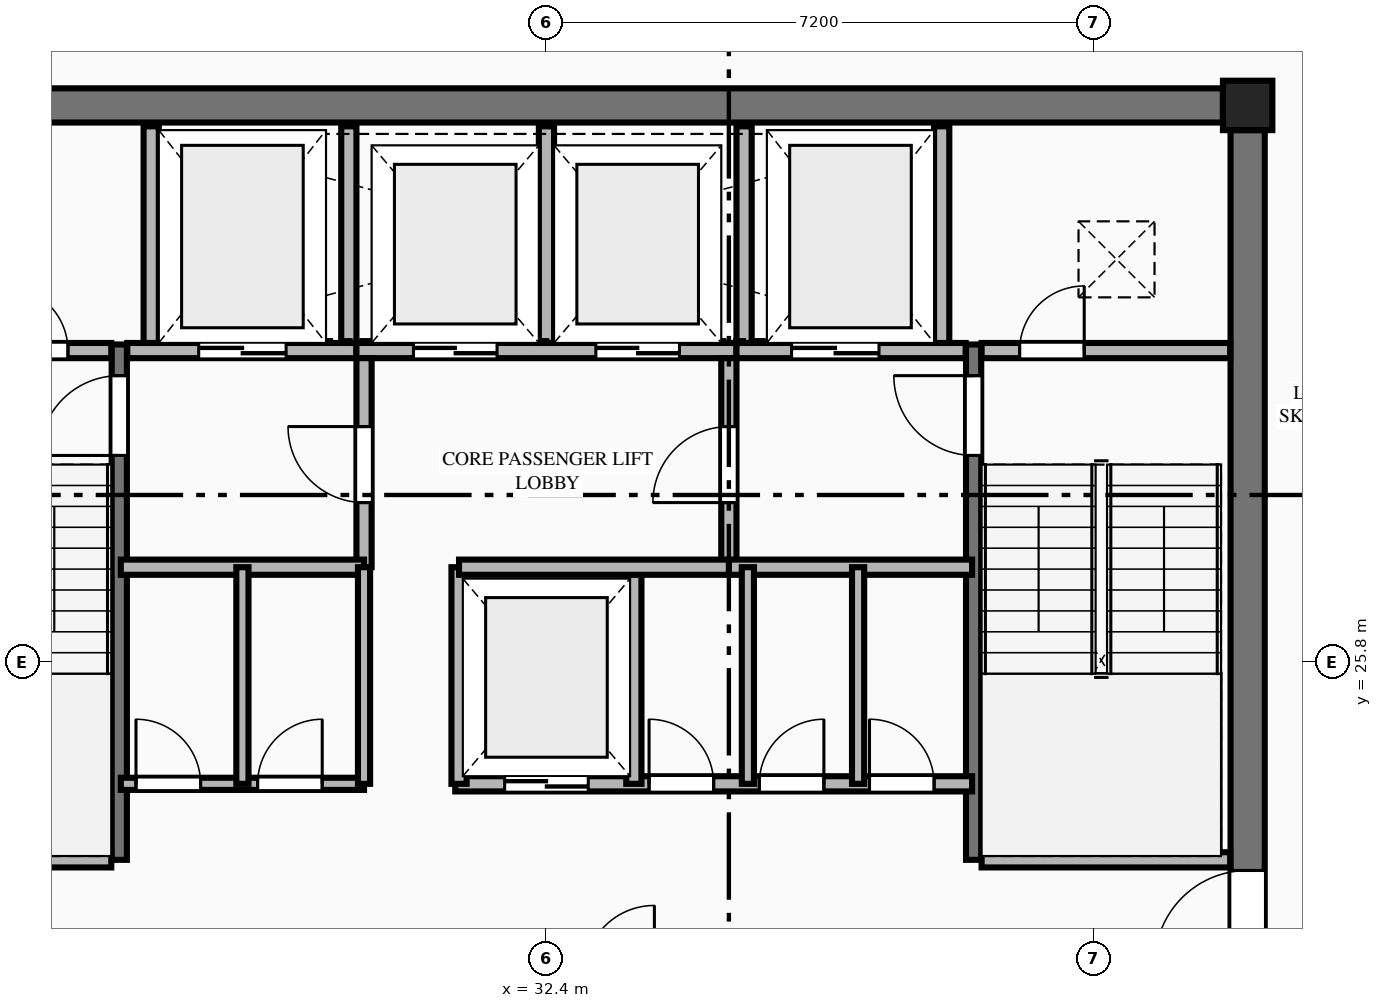
"""IFC4 building model, lengths in metres.
Left out: names, types, materials, properties, quantities, classifications, styles, units other than length and angle.
Written with IfcOpenShell. Run it as: python <this file> out.ifc"""

import sys

from ifc_helpers import new_model, si_unit, direction, frame, frame_2d, origin, origin_2d, place, context, subcontext, project, spatial, rectangle, extrude, element, fill, save


model = new_model("IFC4")
c1 = context("Model", 3, precision=1e-05, world=origin(), true_north=direction((0.0, 1.0)))
c2 = subcontext(c1, "Body", "Model", "MODEL_VIEW")
j1 = project(units=[si_unit("LENGTHUNIT", "METRE"), si_unit("PLANEANGLEUNIT", "RADIAN")], contexts=[c1])
p1 = place(None, origin())
s1 = spatial("IfcSite", under=j1, at=p1, CompositionType="ELEMENT")
p2 = place(p1, origin())
s2 = spatial("IfcBuilding", under=s1, at=p2, CompositionType="ELEMENT")
p3 = place(p2, frame((0.0, 0.0, 234.3)))
s3 = spatial("IfcBuildingStorey", under=s2, at=p3, CompositionType="ELEMENT", Elevation=234.3)
p4 = place(p3, frame((41.625, 33.125, 0.0), z_axis=(0.0, 0.0, 1.0), x_axis=(1.0, 0.0, 0.0)))
e1 = element("IfcColumn", 1, at=p4, inside=s3, PredefinedType="COLUMN", context=c2, shape_type="SweptSolid", body=[
    extrude(rectangle(XDim=0.65, YDim=0.65, at=origin_2d()), origin(), (0.0, 0.0, 1.0), 3.65),
])
p5 = place(p3, frame((23.5, 33.125, 0.0), z_axis=(0.0, 0.0, 1.0), x_axis=(1.0, 0.0, 0.0)))
e2 = element("IfcWall", 2, at=p5, inside=s3, PredefinedType="SHEAR", context=c2, shape_type="SweptSolid", body=[
    extrude(rectangle(XDim=17.8, YDim=0.45, at=frame_2d((8.9, 0.0))), origin(), (0.0, 0.0, 1.0), 3.45),
])
p6 = place(p3, frame((41.625, 19.0, 0.0), z_axis=(0.0, 0.0, 1.0), x_axis=(0.0, 1.0, 0.0)))
e3 = element("IfcWall", 3, at=p6, inside=s3, PredefinedType="SHEAR", context=c2, shape_type="SweptSolid", body=[
    extrude(rectangle(XDim=13.8, YDim=0.45, at=frame_2d((6.9, 0.0))), origin(), (0.0, 0.0, 1.0), 3.45),
])
p7 = place(p6, frame((2.84, 0.0, 0.0)))
e4 = element("IfcOpeningElement", 4, at=p7, cuts=e3, PredefinedType="OPENING", context=c2, shape_type="SweptSolid", body=[
    extrude(rectangle(XDim=1.22, YDim=2.25, at=frame_2d((0.61, 1.125))), frame((0.0, 0.235, 0.0), z_axis=(0.0, -1.0, 0.0), x_axis=(1.0, 0.0, 0.0)), (0.0, 0.0, 1.0), 0.47),
])
p8 = place(p3, frame((26.78, 23.2, 0.0), z_axis=(0.0, 0.0, 1.0), x_axis=(0.0, 1.0, 0.0)))
e5 = element("IfcWall", 5, at=p8, inside=s3, PredefinedType="SHEAR", context=c2, shape_type="SweptSolid", body=[
    extrude(rectangle(XDim=6.78, YDim=0.2, at=frame_2d((3.39, 0.0))), origin(), (0.0, 0.0, 1.0), 3.65),
])
p9 = place(p8, frame((5.32, 0.0, 0.0)))
e6 = element("IfcOpeningElement", 6, at=p9, cuts=e5, PredefinedType="OPENING", context=c2, shape_type="SweptSolid", body=[
    extrude(rectangle(XDim=1.05, YDim=2.15, at=frame_2d((0.525, 1.075))), frame((0.0, 0.11, 0.0), z_axis=(0.0, -1.0, 0.0), x_axis=(1.0, 0.0, 0.0)), (0.0, 0.0, 1.0), 0.22),
])
p10 = place(p3, frame((23.405, 23.2, 0.0), z_axis=(0.0, 0.0, 1.0), x_axis=(1.0, 0.0, 0.0)))
e7 = element("IfcWall", 7, at=p10, inside=s3, PredefinedType="PLUMBINGWALL", context=c2, shape_type="SweptSolid", body=[
    extrude(rectangle(XDim=3.27, YDim=0.2, at=frame_2d((1.635, 0.0))), origin(), (0.0, 0.0, 1.0), 3.45),
])
p11 = place(p3, frame((38.02, 23.2, 0.0), z_axis=(0.0, 0.0, 1.0), x_axis=(0.0, 1.0, 0.0)))
e8 = element("IfcWall", 8, at=p11, inside=s3, PredefinedType="SHEAR", context=c2, shape_type="SweptSolid", body=[
    extrude(rectangle(XDim=6.78, YDim=0.2, at=frame_2d((3.39, 0.0))), origin(), (0.0, 0.0, 1.0), 3.65),
])
p12 = place(p11, frame((5.32, 0.0, 0.0)))
e9 = element("IfcOpeningElement", 9, at=p12, cuts=e8, PredefinedType="OPENING", context=c2, shape_type="SweptSolid", body=[
    extrude(rectangle(XDim=1.05, YDim=2.15, at=frame_2d((0.525, 1.075))), frame((0.0, 0.11, 0.0), z_axis=(0.0, -1.0, 0.0), x_axis=(1.0, 0.0, 0.0)), (0.0, 0.0, 1.0), 0.22),
])
p13 = place(p3, frame((38.125, 23.2, 0.0), z_axis=(0.0, 0.0, 1.0), x_axis=(1.0, 0.0, 0.0)))
e10 = element("IfcWall", 10, at=p13, inside=s3, PredefinedType="PLUMBINGWALL", context=c2, shape_type="SweptSolid", body=[
    extrude(rectangle(XDim=3.27, YDim=0.2, at=frame_2d((1.635, 0.0))), origin(), (0.0, 0.0, 1.0), 3.45),
])
p14 = place(p3, frame((23.405, 29.9, 0.0), z_axis=(0.0, 0.0, 1.0), x_axis=(1.0, 0.0, 0.0)))
e11 = element("IfcWall", 11, at=p14, inside=s3, PredefinedType="PLUMBINGWALL", context=c2, shape_type="SweptSolid", body=[
    extrude(rectangle(XDim=3.27, YDim=0.2, at=frame_2d((1.635, 0.0))), origin(), (0.0, 0.0, 1.0), 3.45),
])
p15 = place(p14, frame((1.85, 0.0, 0.0)))
e12 = element("IfcOpeningElement", 12, at=p15, cuts=e11, PredefinedType="OPENING", context=c2, shape_type="SweptSolid", body=[
    extrude(rectangle(XDim=0.85, YDim=2.05, at=frame_2d((0.425, 1.025))), frame((0.0, 0.11, 0.0), z_axis=(0.0, -1.0, 0.0), x_axis=(1.0, 0.0, 0.0)), (0.0, 0.0, 1.0), 0.22),
])
p16 = place(p3, frame((26.885, 29.9, 0.0), z_axis=(0.0, 0.0, 1.0), x_axis=(1.0, 0.0, 0.0)))
e13 = element("IfcWall", 13, at=p16, inside=s3, PredefinedType="PLUMBINGWALL", context=c2, shape_type="SweptSolid", body=[
    extrude(rectangle(XDim=3.015, YDim=0.2, at=frame_2d((1.507, 0.0))), origin(), (0.0, 0.0, 1.0), 3.45),
])
p17 = place(p16, frame((0.94, 0.0, 0.0)))
e14 = element("IfcOpeningElement", 14, at=p17, cuts=e13, PredefinedType="OPENING", context=c2, shape_type="SweptSolid", body=[
    extrude(rectangle(XDim=1.15, YDim=2.2, at=frame_2d((0.575, 1.1))), frame((0.0, 0.11, 0.0), z_axis=(0.0, -1.0, 0.0), x_axis=(1.0, 0.0, 0.0)), (0.0, 0.0, 1.0), 0.22),
])
p18 = place(p3, frame((29.9, 29.9, 0.0), z_axis=(0.0, 0.0, 1.0), x_axis=(1.0, 0.0, 0.0)))
e15 = element("IfcWall", 15, at=p18, inside=s3, PredefinedType="PLUMBINGWALL", context=c2, shape_type="SweptSolid", body=[
    extrude(rectangle(XDim=5.0, YDim=0.2, at=frame_2d((2.5, 0.0))), origin(), (0.0, 0.0, 1.0), 3.45),
])
p19 = place(p18, frame((0.75, 0.0, 0.0)))
e16 = element("IfcOpeningElement", 16, at=p19, cuts=e15, PredefinedType="OPENING", context=c2, shape_type="SweptSolid", body=[
    extrude(rectangle(XDim=1.1, YDim=2.2, at=frame_2d((0.55, 1.1))), frame((0.0, 0.11, 0.0), z_axis=(0.0, -1.0, 0.0), x_axis=(1.0, 0.0, 0.0)), (0.0, 0.0, 1.0), 0.22),
])
p20 = place(p18, frame((3.15, 0.0, 0.0)))
e17 = element("IfcOpeningElement", 17, at=p20, cuts=e15, PredefinedType="OPENING", context=c2, shape_type="SweptSolid", body=[
    extrude(rectangle(XDim=1.1, YDim=2.2, at=frame_2d((0.55, 1.1))), frame((0.0, 0.11, 0.0), z_axis=(0.0, -1.0, 0.0), x_axis=(1.0, 0.0, 0.0)), (0.0, 0.0, 1.0), 0.22),
])
p21 = place(p3, frame((34.9, 29.9, 0.0), z_axis=(0.0, 0.0, 1.0), x_axis=(1.0, 0.0, 0.0)))
e18 = element("IfcWall", 18, at=p21, inside=s3, PredefinedType="PLUMBINGWALL", context=c2, shape_type="SweptSolid", body=[
    extrude(rectangle(XDim=3.015, YDim=0.2, at=frame_2d((1.508, 0.0))), origin(), (0.0, 0.0, 1.0), 3.45),
])
p22 = place(p21, frame((0.725, 0.0, 0.0)))
e19 = element("IfcOpeningElement", 19, at=p22, cuts=e18, PredefinedType="OPENING", context=c2, shape_type="SweptSolid", body=[
    extrude(rectangle(XDim=1.15, YDim=2.2, at=frame_2d((0.575, 1.1))), frame((0.0, 0.11, 0.0), z_axis=(0.0, -1.0, 0.0), x_axis=(1.0, 0.0, 0.0)), (0.0, 0.0, 1.0), 0.22),
])
p23 = place(p3, frame((38.125, 29.9, 0.0), z_axis=(0.0, 0.0, 1.0), x_axis=(1.0, 0.0, 0.0)))
e20 = element("IfcWall", 20, at=p23, inside=s3, PredefinedType="PLUMBINGWALL", context=c2, shape_type="SweptSolid", body=[
    extrude(rectangle(XDim=3.27, YDim=0.2, at=frame_2d((1.635, 0.0))), origin(), (0.0, 0.0, 1.0), 3.45),
])
p24 = place(p23, frame((0.5, 0.0, 0.0)))
e21 = element("IfcOpeningElement", 21, at=p24, cuts=e20, PredefinedType="OPENING", context=c2, shape_type="SweptSolid", body=[
    extrude(rectangle(XDim=0.85, YDim=2.05, at=frame_2d((0.425, 1.025))), frame((0.0, 0.11, 0.0), z_axis=(0.0, -1.0, 0.0), x_axis=(1.0, 0.0, 0.0)), (0.0, 0.0, 1.0), 0.22),
])
for number, where, z_axis, x_axis in (
    (22, (27.2, 30.0, 0.0), (0.0, 0.0, 1.0), (0.0, 1.0, 0.0)),
    (23, (29.8, 30.0, 0.0), (0.0, 0.0, 1.0), (0.0, 1.0, 0.0)),
    (24, (32.4, 30.0, 0.0), (0.0, 0.0, 1.0), (0.0, 1.0, 0.0)),
    (25, (35.0, 30.0, 0.0), (0.0, 0.0, 1.0), (0.0, 1.0, 0.0)),
    (26, (37.6, 30.0, 0.0), (0.0, 0.0, 1.0), (0.0, 1.0, 0.0)),
):
    element("IfcWall", number, at=place(p3, frame(where, z_axis=z_axis, x_axis=x_axis)), inside=s3, PredefinedType="PLUMBINGWALL", context=c2, shape_type="SweptSolid", body=[
        extrude(rectangle(XDim=2.85, YDim=0.2, at=frame_2d((1.425, 0.0))), origin(), (0.0, 0.0, 1.0), 3.45),
    ])
p25 = place(p3, frame((30.0, 27.05, 0.0), z_axis=(0.0, 0.0, 1.0), x_axis=(0.0, 1.0, 0.0)))
e27 = element("IfcWall", 27, at=p25, inside=s3, PredefinedType="PLUMBINGWALL", context=c2, shape_type="SweptSolid", body=[
    extrude(rectangle(XDim=2.75, YDim=0.2, at=frame_2d((1.375, 0.0))), origin(), (0.0, 0.0, 1.0), 3.45),
])
p26 = place(p25, frame((0.85, 0.0, 0.0)))
e28 = element("IfcOpeningElement", 28, at=p26, cuts=e27, PredefinedType="OPENING", context=c2, shape_type="SweptSolid", body=[
    extrude(rectangle(XDim=1.0, YDim=2.15, at=frame_2d((0.5, 1.075))), frame((0.0, 0.11, 0.0), z_axis=(0.0, -1.0, 0.0), x_axis=(1.0, 0.0, 0.0)), (0.0, 0.0, 1.0), 0.22),
])
p27 = place(p3, frame((26.8, 27.05, 0.0), z_axis=(0.0, 0.0, 1.0), x_axis=(1.0, 0.0, 0.0)))
e29 = element("IfcWall", 29, at=p27, inside=s3, PredefinedType="PLUMBINGWALL", context=c2, shape_type="SweptSolid", body=[
    extrude(rectangle(XDim=3.2, YDim=0.2, at=frame_2d((1.6, 0.0))), origin(), (0.0, 0.0, 1.0), 3.45),
])
p28 = place(p3, frame((34.8, 27.05, 0.0), z_axis=(0.0, 0.0, 1.0), x_axis=(0.0, 1.0, 0.0)))
e30 = element("IfcWall", 30, at=p28, inside=s3, PredefinedType="PLUMBINGWALL", context=c2, shape_type="SweptSolid", body=[
    extrude(rectangle(XDim=2.75, YDim=0.2, at=frame_2d((1.375, 0.0))), origin(), (0.0, 0.0, 1.0), 3.45),
])
p29 = place(p28, frame((0.85, 0.0, 0.0)))
e31 = element("IfcOpeningElement", 31, at=p29, cuts=e30, PredefinedType="OPENING", context=c2, shape_type="SweptSolid", body=[
    extrude(rectangle(XDim=1.0, YDim=2.15, at=frame_2d((0.5, 1.075))), frame((0.0, 0.11, 0.0), z_axis=(0.0, -1.0, 0.0), x_axis=(1.0, 0.0, 0.0)), (0.0, 0.0, 1.0), 0.22),
])
p30 = place(p3, frame((34.8, 27.05, 0.0), z_axis=(0.0, 0.0, 1.0), x_axis=(1.0, 0.0, 0.0)))
e32 = element("IfcWall", 32, at=p30, inside=s3, PredefinedType="PLUMBINGWALL", context=c2, shape_type="SweptSolid", body=[
    extrude(rectangle(XDim=3.2, YDim=0.2, at=frame_2d((1.6, 0.0))), origin(), (0.0, 0.0, 1.0), 3.45),
])
p31 = place(p3, frame((26.8, 24.2, 0.0), z_axis=(0.0, 0.0, 1.0), x_axis=(1.0, 0.0, 0.0)))
e33 = element("IfcWall", 33, at=p31, inside=s3, PredefinedType="PARTITIONING", context=c2, shape_type="SweptSolid", body=[
    extrude(rectangle(XDim=3.2, YDim=0.16, at=frame_2d((1.6, 0.0))), origin(), (0.0, 0.0, 1.0), 3.45),
])
p32 = place(p31, frame((0.2, 0.0, 0.0)))
e34 = element("IfcOpeningElement", 34, at=p32, cuts=e33, PredefinedType="OPENING", context=c2, shape_type="SweptSolid", body=[
    extrude(rectangle(XDim=0.85, YDim=2.05, at=frame_2d((0.425, 1.025))), frame((0.0, 0.09, 0.0), z_axis=(0.0, -1.0, 0.0), x_axis=(1.0, 0.0, 0.0)), (0.0, 0.0, 1.0), 0.18),
])
p33 = place(p31, frame((1.8, 0.0, 0.0)))
e35 = element("IfcOpeningElement", 35, at=p33, cuts=e33, PredefinedType="OPENING", context=c2, shape_type="SweptSolid", body=[
    extrude(rectangle(XDim=0.85, YDim=2.05, at=frame_2d((0.425, 1.025))), frame((0.0, 0.09, 0.0), z_axis=(0.0, -1.0, 0.0), x_axis=(1.0, 0.0, 0.0)), (0.0, 0.0, 1.0), 0.18),
])
p34 = place(p3, frame((30.0, 24.2, 0.0), z_axis=(0.0, 0.0, 1.0), x_axis=(0.0, 1.0, 0.0)))
e36 = element("IfcWall", 36, at=p34, inside=s3, PredefinedType="PARTITIONING", context=c2, shape_type="SweptSolid", body=[
    extrude(rectangle(XDim=2.85, YDim=0.16, at=frame_2d((1.425, 0.0))), origin(), (0.0, 0.0, 1.0), 3.45),
])
p35 = place(p3, frame((31.2, 24.2, 0.0), z_axis=(0.0, 0.0, 1.0), x_axis=(1.0, 0.0, 0.0)))
e37 = element("IfcWall", 37, at=p35, inside=s3, PredefinedType="PLUMBINGWALL", context=c2, shape_type="SweptSolid", body=[
    extrude(rectangle(XDim=6.8, YDim=0.2, at=frame_2d((3.4, 0.0))), origin(), (0.0, 0.0, 1.0), 3.45),
])
p36 = place(p35, frame((0.65, 0.0, 0.0)))
e38 = element("IfcOpeningElement", 38, at=p36, cuts=e37, PredefinedType="OPENING", context=c2, shape_type="SweptSolid", body=[
    extrude(rectangle(XDim=1.1, YDim=2.2, at=frame_2d((0.55, 1.1))), frame((0.0, 0.11, 0.0), z_axis=(0.0, -1.0, 0.0), x_axis=(1.0, 0.0, 0.0)), (0.0, 0.0, 1.0), 0.22),
])
p37 = place(p35, frame((2.55, 0.0, 0.0)))
e39 = element("IfcOpeningElement", 39, at=p37, cuts=e37, PredefinedType="OPENING", context=c2, shape_type="SweptSolid", body=[
    extrude(rectangle(XDim=0.85, YDim=2.05, at=frame_2d((0.425, 1.025))), frame((0.0, 0.11, 0.0), z_axis=(0.0, -1.0, 0.0), x_axis=(1.0, 0.0, 0.0)), (0.0, 0.0, 1.0), 0.22),
])
p38 = place(p35, frame((4.0, 0.0, 0.0)))
e40 = element("IfcOpeningElement", 40, at=p38, cuts=e37, PredefinedType="OPENING", context=c2, shape_type="SweptSolid", body=[
    extrude(rectangle(XDim=0.85, YDim=2.05, at=frame_2d((0.425, 1.025))), frame((0.0, 0.11, 0.0), z_axis=(0.0, -1.0, 0.0), x_axis=(1.0, 0.0, 0.0)), (0.0, 0.0, 1.0), 0.22),
])
p39 = place(p35, frame((5.45, 0.0, 0.0)))
e41 = element("IfcOpeningElement", 41, at=p39, cuts=e37, PredefinedType="OPENING", context=c2, shape_type="SweptSolid", body=[
    extrude(rectangle(XDim=0.85, YDim=2.05, at=frame_2d((0.425, 1.025))), frame((0.0, 0.11, 0.0), z_axis=(0.0, -1.0, 0.0), x_axis=(1.0, 0.0, 0.0)), (0.0, 0.0, 1.0), 0.22),
])
for number, where, z_axis, x_axis in (
    (42, (31.25, 24.2, 0.0), (0.0, 0.0, 1.0), (0.0, 1.0, 0.0)),
    (43, (33.55, 24.2, 0.0), (0.0, 0.0, 1.0), (0.0, 1.0, 0.0)),
):
    element("IfcWall", number, at=place(p3, frame(where, z_axis=z_axis, x_axis=x_axis)), inside=s3, PredefinedType="PLUMBINGWALL", context=c2, shape_type="SweptSolid", body=[
        extrude(rectangle(XDim=2.85, YDim=0.2, at=frame_2d((1.425, 0.0))), origin(), (0.0, 0.0, 1.0), 3.45),
    ])
p40 = place(p3, frame((31.25, 27.05, 0.0), z_axis=(0.0, 0.0, 1.0), x_axis=(1.0, 0.0, 0.0)))
e44 = element("IfcWall", 44, at=p40, inside=s3, PredefinedType="PLUMBINGWALL", context=c2, shape_type="SweptSolid", body=[
    extrude(rectangle(XDim=3.55, YDim=0.2, at=frame_2d((1.775, 0.0))), origin(), (0.0, 0.0, 1.0), 3.45),
])
for number, where, z_axis, x_axis in (
    (45, (28.4, 24.2, 0.0), (0.0, 0.0, 1.0), (0.0, 1.0, 0.0)),
    (46, (35.05, 24.2, 0.0), (0.0, 0.0, 1.0), (0.0, 1.0, 0.0)),
    (47, (36.5, 24.2, 0.0), (0.0, 0.0, 1.0), (0.0, 1.0, 0.0)),
):
    element("IfcWall", number, at=place(p3, frame(where, z_axis=z_axis, x_axis=x_axis)), inside=s3, PredefinedType="PARTITIONING", context=c2, shape_type="SweptSolid", body=[
        extrude(rectangle(XDim=2.85, YDim=0.16, at=frame_2d((1.425, 0.0))), origin(), (0.0, 0.0, 1.0), 3.45),
    ])
p41 = place(p7, origin())
e48 = element("IfcDoor", 48, at=p41, inside=s3, OperationType="SINGLE_SWING_LEFT", PredefinedType="DOOR", context=c2, shape_type="SweptSolid", body=[
    extrude(rectangle(XDim=1.22, YDim=2.25, at=frame_2d((0.61, 1.125))), frame((0.0, 0.025, 0.0), z_axis=(0.0, -1.0, 0.0), x_axis=(1.0, 0.0, 0.0)), (0.0, 0.0, 1.0), 0.05),
])
fill(e4, e48)
p42 = place(p9, origin())
e49 = element("IfcDoor", 49, at=p42, inside=s3, OperationType="SINGLE_SWING_LEFT", PredefinedType="DOOR", context=c2, shape_type="SweptSolid", body=[
    extrude(rectangle(XDim=1.05, YDim=2.15, at=frame_2d((0.525, 1.075))), frame((0.0, 0.025, 0.0), z_axis=(0.0, -1.0, 0.0), x_axis=(1.0, 0.0, 0.0)), (0.0, 0.0, 1.0), 0.05),
])
fill(e6, e49)
p43 = place(p12, origin())
e50 = element("IfcDoor", 50, at=p43, inside=s3, OperationType="SINGLE_SWING_RIGHT", PredefinedType="DOOR", context=c2, shape_type="SweptSolid", body=[
    extrude(rectangle(XDim=1.05, YDim=2.15, at=frame_2d((0.525, 1.075))), frame((0.0, 0.025, 0.0), z_axis=(0.0, -1.0, 0.0), x_axis=(1.0, 0.0, 0.0)), (0.0, 0.0, 1.0), 0.05),
])
fill(e9, e50)
p44 = place(p15, origin())
e51 = element("IfcDoor", 51, at=p44, inside=s3, OperationType="SINGLE_SWING_LEFT", PredefinedType="DOOR", context=c2, shape_type="SweptSolid", body=[
    extrude(rectangle(XDim=0.85, YDim=2.05, at=frame_2d((0.425, 1.025))), frame((0.0, 0.025, 0.0), z_axis=(0.0, -1.0, 0.0), x_axis=(1.0, 0.0, 0.0)), (0.0, 0.0, 1.0), 0.05),
])
fill(e12, e51)
p45 = place(p24, origin())
e52 = element("IfcDoor", 52, at=p45, inside=s3, OperationType="SINGLE_SWING_RIGHT", PredefinedType="DOOR", context=c2, shape_type="SweptSolid", body=[
    extrude(rectangle(XDim=0.85, YDim=2.05, at=frame_2d((0.425, 1.025))), frame((0.0, 0.025, 0.0), z_axis=(0.0, -1.0, 0.0), x_axis=(1.0, 0.0, 0.0)), (0.0, 0.0, 1.0), 0.05),
])
fill(e21, e52)
p46 = place(p17, origin())
e53 = element("IfcDoor", 53, at=p46, inside=s3, OperationType="DOUBLE_DOOR_SLIDING", PredefinedType="DOOR", context=c2, shape_type="SweptSolid", body=[
    extrude(rectangle(XDim=1.15, YDim=2.2, at=frame_2d((0.575, 1.1))), frame((0.0, 0.025, 0.0), z_axis=(0.0, -1.0, 0.0), x_axis=(1.0, 0.0, 0.0)), (0.0, 0.0, 1.0), 0.05),
])
fill(e14, e53)
p47 = place(p22, origin())
e54 = element("IfcDoor", 54, at=p47, inside=s3, OperationType="DOUBLE_DOOR_SLIDING", PredefinedType="DOOR", context=c2, shape_type="SweptSolid", body=[
    extrude(rectangle(XDim=1.15, YDim=2.2, at=frame_2d((0.575, 1.1))), frame((0.0, 0.025, 0.0), z_axis=(0.0, -1.0, 0.0), x_axis=(1.0, 0.0, 0.0)), (0.0, 0.0, 1.0), 0.05),
])
fill(e19, e54)
p48 = place(p19, origin())
e55 = element("IfcDoor", 55, at=p48, inside=s3, OperationType="DOUBLE_DOOR_SLIDING", PredefinedType="DOOR", context=c2, shape_type="SweptSolid", body=[
    extrude(rectangle(XDim=1.1, YDim=2.2, at=frame_2d((0.55, 1.1))), frame((0.0, 0.025, 0.0), z_axis=(0.0, -1.0, 0.0), x_axis=(1.0, 0.0, 0.0)), (0.0, 0.0, 1.0), 0.05),
])
fill(e16, e55)
p49 = place(p20, origin())
e56 = element("IfcDoor", 56, at=p49, inside=s3, OperationType="DOUBLE_DOOR_SLIDING", PredefinedType="DOOR", context=c2, shape_type="SweptSolid", body=[
    extrude(rectangle(XDim=1.1, YDim=2.2, at=frame_2d((0.55, 1.1))), frame((0.0, 0.025, 0.0), z_axis=(0.0, -1.0, 0.0), x_axis=(1.0, 0.0, 0.0)), (0.0, 0.0, 1.0), 0.05),
])
fill(e17, e56)
p50 = place(p26, origin())
e57 = element("IfcDoor", 57, at=p50, inside=s3, OperationType="SINGLE_SWING_RIGHT", PredefinedType="DOOR", context=c2, shape_type="SweptSolid", body=[
    extrude(rectangle(XDim=1.0, YDim=2.15, at=frame_2d((0.5, 1.075))), frame((0.0, 0.025, 0.0), z_axis=(0.0, -1.0, 0.0), x_axis=(1.0, 0.0, 0.0)), (0.0, 0.0, 1.0), 0.05),
])
fill(e28, e57)
p51 = place(p29, origin())
e58 = element("IfcDoor", 58, at=p51, inside=s3, OperationType="SINGLE_SWING_LEFT", PredefinedType="DOOR", context=c2, shape_type="SweptSolid", body=[
    extrude(rectangle(XDim=1.0, YDim=2.15, at=frame_2d((0.5, 1.075))), frame((0.0, 0.025, 0.0), z_axis=(0.0, -1.0, 0.0), x_axis=(1.0, 0.0, 0.0)), (0.0, 0.0, 1.0), 0.05),
])
fill(e31, e58)
p52 = place(p36, origin())
e59 = element("IfcDoor", 59, at=p52, inside=s3, OperationType="DOUBLE_DOOR_SLIDING", PredefinedType="DOOR", context=c2, shape_type="SweptSolid", body=[
    extrude(rectangle(XDim=1.1, YDim=2.2, at=frame_2d((0.55, 1.1))), frame((0.0, 0.025, 0.0), z_axis=(0.0, -1.0, 0.0), x_axis=(1.0, 0.0, 0.0)), (0.0, 0.0, 1.0), 0.05),
])
fill(e38, e59)
p53 = place(p32, origin())
e60 = element("IfcDoor", 60, at=p53, inside=s3, OperationType="SINGLE_SWING_LEFT", PredefinedType="DOOR", context=c2, shape_type="SweptSolid", body=[
    extrude(rectangle(XDim=0.85, YDim=2.05, at=frame_2d((0.425, 1.025))), frame((0.0, 0.025, 0.0), z_axis=(0.0, -1.0, 0.0), x_axis=(1.0, 0.0, 0.0)), (0.0, 0.0, 1.0), 0.05),
])
fill(e34, e60)
p54 = place(p33, origin())
e61 = element("IfcDoor", 61, at=p54, inside=s3, OperationType="SINGLE_SWING_RIGHT", PredefinedType="DOOR", context=c2, shape_type="SweptSolid", body=[
    extrude(rectangle(XDim=0.85, YDim=2.05, at=frame_2d((0.425, 1.025))), frame((0.0, 0.025, 0.0), z_axis=(0.0, -1.0, 0.0), x_axis=(1.0, 0.0, 0.0)), (0.0, 0.0, 1.0), 0.05),
])
fill(e35, e61)
p55 = place(p37, origin())
e62 = element("IfcDoor", 62, at=p55, inside=s3, OperationType="SINGLE_SWING_LEFT", PredefinedType="DOOR", context=c2, shape_type="SweptSolid", body=[
    extrude(rectangle(XDim=0.85, YDim=2.05, at=frame_2d((0.425, 1.025))), frame((0.0, 0.025, 0.0), z_axis=(0.0, -1.0, 0.0), x_axis=(1.0, 0.0, 0.0)), (0.0, 0.0, 1.0), 0.05),
])
fill(e39, e62)
p56 = place(p38, origin())
e63 = element("IfcDoor", 63, at=p56, inside=s3, OperationType="SINGLE_SWING_RIGHT", PredefinedType="DOOR", context=c2, shape_type="SweptSolid", body=[
    extrude(rectangle(XDim=0.85, YDim=2.05, at=frame_2d((0.425, 1.025))), frame((0.0, 0.025, 0.0), z_axis=(0.0, -1.0, 0.0), x_axis=(1.0, 0.0, 0.0)), (0.0, 0.0, 1.0), 0.05),
])
fill(e40, e63)
p57 = place(p39, origin())
e64 = element("IfcDoor", 64, at=p57, inside=s3, OperationType="SINGLE_SWING_LEFT", PredefinedType="DOOR", context=c2, shape_type="SweptSolid", body=[
    extrude(rectangle(XDim=0.85, YDim=2.05, at=frame_2d((0.425, 1.025))), frame((0.0, 0.025, 0.0), z_axis=(0.0, -1.0, 0.0), x_axis=(1.0, 0.0, 0.0)), (0.0, 0.0, 1.0), 0.05),
])
fill(e41, e64)
save(model, sys.argv[1])
